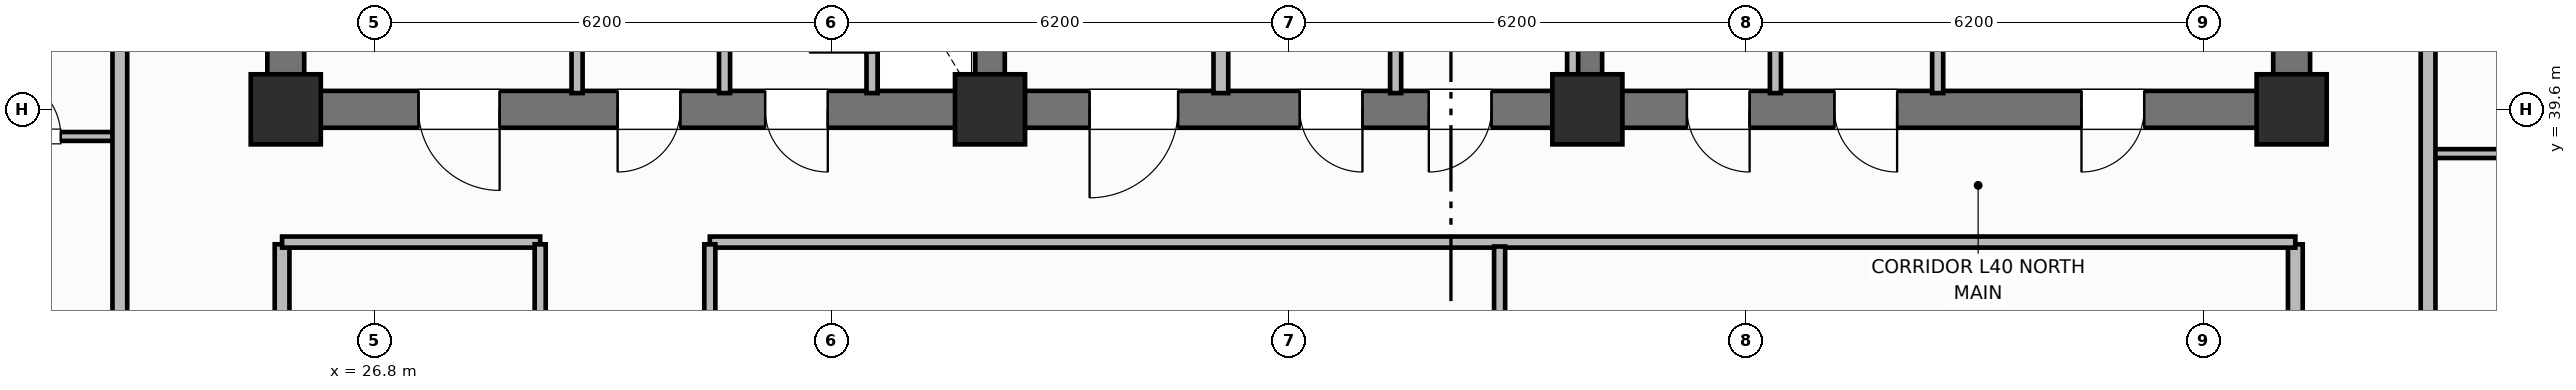
"""IFC4 building model, lengths in metres.
Left out: names, types, materials, properties, quantities, classifications, styles, units other than length and angle.
Written with IfcOpenShell. Run it as: python <this file> out.ifc"""

import sys

from ifc_helpers import new_model, si_unit, direction, frame, frame_2d, origin, origin_2d, place, context, subcontext, project, spatial, rectangle, extrude, element, fill, save


model = new_model("IFC4")
c1 = context("Model", 3, precision=1e-05, world=origin(), true_north=direction((0.0, 1.0)))
c2 = subcontext(c1, "Body", "Model", "MODEL_VIEW")
j1 = project(units=[si_unit("LENGTHUNIT", "METRE"), si_unit("PLANEANGLEUNIT", "RADIAN")], contexts=[c1])
p1 = place(None, origin())
s1 = spatial("IfcSite", under=j1, at=p1, CompositionType="ELEMENT")
p2 = place(p1, origin())
s2 = spatial("IfcBuilding", under=s1, at=p2, CompositionType="ELEMENT")
p3 = place(p2, frame((0.0, 0.0, 162.6)))
s3 = spatial("IfcBuildingStorey", under=s2, at=p3, CompositionType="ELEMENT", Elevation=162.6)
for number, where, z_axis, x_axis in (
    (1, (25.6, 39.85, 0.0), (0.0, 0.0, 1.0), (0.0, 1.0, 0.0)),
    (2, (52.8, 39.85, 0.0), (0.0, 0.0, 1.0), (0.0, 1.0, 0.0)),
):
    element("IfcWall", number, at=place(p3, frame(where, z_axis=z_axis, x_axis=x_axis)), inside=s3, PredefinedType="SHEAR", context=c2, shape_type="SweptSolid", body=[
        extrude(rectangle(XDim=5.7, YDim=0.5, at=frame_2d((2.85, 0.0))), origin(), (0.0, 0.0, 1.0), 3.7),
    ])
p4 = place(p3, frame((52.8, 39.6, 0.0), z_axis=(0.0, 0.0, 1.0), x_axis=(-1.0, 0.0, 0.0)))
e3 = element("IfcWall", 3, at=p4, inside=s3, PredefinedType="SHEAR", context=c2, shape_type="SweptSolid", body=[
    extrude(rectangle(XDim=27.2, YDim=0.5, at=frame_2d((13.6, 0.0))), origin(), (0.0, 0.0, 1.0), 3.7),
])
p5 = place(p4, frame((24.3, 0.0, 0.0)))
e4 = element("IfcOpeningElement", 4, at=p5, cuts=e3, PredefinedType="OPENING", context=c2, shape_type="SweptSolid", body=[
    extrude(rectangle(XDim=1.1, YDim=2.15, at=frame_2d((0.55, 1.075))), frame((0.0, 0.26, 0.0), z_axis=(0.0, -1.0, 0.0), x_axis=(1.0, 0.0, 0.0)), (0.0, 0.0, 1.0), 0.52),
])
p6 = place(p4, frame((21.85, 0.0, 0.0)))
e5 = element("IfcOpeningElement", 5, at=p6, cuts=e3, PredefinedType="OPENING", context=c2, shape_type="SweptSolid", body=[
    extrude(rectangle(XDim=0.85, YDim=2.1, at=frame_2d((0.425, 1.05))), frame((0.0, 0.26, 0.0), z_axis=(0.0, -1.0, 0.0), x_axis=(1.0, 0.0, 0.0)), (0.0, 0.0, 1.0), 0.52),
])
p7 = place(p4, frame((19.85, 0.0, 0.0)))
e6 = element("IfcOpeningElement", 6, at=p7, cuts=e3, PredefinedType="OPENING", context=c2, shape_type="SweptSolid", body=[
    extrude(rectangle(XDim=0.85, YDim=2.1, at=frame_2d((0.425, 1.05))), frame((0.0, 0.26, 0.0), z_axis=(0.0, -1.0, 0.0), x_axis=(1.0, 0.0, 0.0)), (0.0, 0.0, 1.0), 0.52),
])
p8 = place(p4, frame((15.1, 0.0, 0.0)))
e7 = element("IfcOpeningElement", 7, at=p8, cuts=e3, PredefinedType="OPENING", context=c2, shape_type="SweptSolid", body=[
    extrude(rectangle(XDim=1.2, YDim=2.15, at=frame_2d((0.6, 1.075))), frame((0.0, 0.26, 0.0), z_axis=(0.0, -1.0, 0.0), x_axis=(1.0, 0.0, 0.0)), (0.0, 0.0, 1.0), 0.52),
])
p9 = place(p4, frame((12.6, 0.0, 0.0)))
e8 = element("IfcOpeningElement", 8, at=p9, cuts=e3, PredefinedType="OPENING", context=c2, shape_type="SweptSolid", body=[
    extrude(rectangle(XDim=0.85, YDim=2.1, at=frame_2d((0.425, 1.05))), frame((0.0, 0.26, 0.0), z_axis=(0.0, -1.0, 0.0), x_axis=(1.0, 0.0, 0.0)), (0.0, 0.0, 1.0), 0.52),
])
p10 = place(p4, frame((10.85, 0.0, 0.0)))
e9 = element("IfcOpeningElement", 9, at=p10, cuts=e3, PredefinedType="OPENING", context=c2, shape_type="SweptSolid", body=[
    extrude(rectangle(XDim=0.85, YDim=2.1, at=frame_2d((0.425, 1.05))), frame((0.0, 0.26, 0.0), z_axis=(0.0, -1.0, 0.0), x_axis=(1.0, 0.0, 0.0)), (0.0, 0.0, 1.0), 0.52),
])
p11 = place(p4, frame((7.35, 0.0, 0.0)))
e10 = element("IfcOpeningElement", 10, at=p11, cuts=e3, PredefinedType="OPENING", context=c2, shape_type="SweptSolid", body=[
    extrude(rectangle(XDim=0.85, YDim=2.1, at=frame_2d((0.425, 1.05))), frame((0.0, 0.26, 0.0), z_axis=(0.0, -1.0, 0.0), x_axis=(1.0, 0.0, 0.0)), (0.0, 0.0, 1.0), 0.52),
])
p12 = place(p4, frame((5.35, 0.0, 0.0)))
e11 = element("IfcOpeningElement", 11, at=p12, cuts=e3, PredefinedType="OPENING", context=c2, shape_type="SweptSolid", body=[
    extrude(rectangle(XDim=0.85, YDim=2.1, at=frame_2d((0.425, 1.05))), frame((0.0, 0.26, 0.0), z_axis=(0.0, -1.0, 0.0), x_axis=(1.0, 0.0, 0.0)), (0.0, 0.0, 1.0), 0.52),
])
p13 = place(p4, frame((2.0, 0.0, 0.0)))
e12 = element("IfcOpeningElement", 12, at=p13, cuts=e3, PredefinedType="OPENING", context=c2, shape_type="SweptSolid", body=[
    extrude(rectangle(XDim=0.85, YDim=2.1, at=frame_2d((0.425, 1.05))), frame((0.0, 0.26, 0.0), z_axis=(0.0, -1.0, 0.0), x_axis=(1.0, 0.0, 0.0)), (0.0, 0.0, 1.0), 0.52),
])
for number, where, z_axis, x_axis in (
    (13, (35.15, 39.85, 0.0), (0.0, 0.0, 1.0), (0.0, 1.0, 0.0)),
    (14, (43.25, 39.85, 0.0), (0.0, 0.0, 1.0), (0.0, 1.0, 0.0)),
):
    element("IfcWall", number, at=place(p3, frame(where, z_axis=z_axis, x_axis=x_axis)), inside=s3, PredefinedType="SHEAR", context=c2, shape_type="SweptSolid", body=[
        extrude(rectangle(XDim=5.7, YDim=0.4, at=frame_2d((2.85, 0.0))), origin(), (0.0, 0.0, 1.0), 3.7),
    ])
for number, where, z_axis, x_axis in (
    (15, (25.6, 39.6, 0.0), (0.0, 0.0, 1.0), (1.0, 0.0, 0.0)),
    (16, (35.15, 39.6, 0.0), (0.0, 0.0, 1.0), (1.0, 0.0, 0.0)),
    (17, (43.25, 39.6, 0.0), (0.0, 0.0, 1.0), (1.0, 0.0, 0.0)),
    (18, (52.8, 39.6, 0.0), (0.0, 0.0, 1.0), (1.0, 0.0, 0.0)),
):
    element("IfcColumn", number, at=place(p3, frame(where, z_axis=z_axis, x_axis=x_axis)), inside=s3, PredefinedType="COLUMN", context=c2, shape_type="SweptSolid", body=[
        extrude(rectangle(XDim=0.95, YDim=0.95, at=origin_2d()), origin(), (0.0, 0.0, 1.0), 3.7),
    ])
p14 = place(p3, frame((33.55, 39.82, 0.0), z_axis=(0.0, 0.0, 1.0), x_axis=(0.0, 1.0, 0.0)))
e19 = element("IfcWall", 19, at=p14, inside=s3, PredefinedType="PARTITIONING", context=c2, shape_type="SweptSolid", body=[
    extrude(rectangle(XDim=2.13, YDim=0.15, at=frame_2d((1.065, 0.0))), origin(), (0.0, 0.0, 1.0), 2.55),
])
p15 = place(p14, frame((0.55, 0.0, 0.0)))
e20 = element("IfcOpeningElement", 20, at=p15, cuts=e19, PredefinedType="OPENING", context=c2, shape_type="SweptSolid", body=[
    extrude(rectangle(XDim=0.85, YDim=2.05, at=frame_2d((0.425, 1.025))), frame((0.0, 0.085, 0.0), z_axis=(0.0, -1.0, 0.0), x_axis=(1.0, 0.0, 0.0)), (0.0, 0.0, 1.0), 0.17),
])
for number, where, z_axis, x_axis in (
    (21, (29.55, 39.82, 0.0), (0.0, 0.0, 1.0), (0.0, 1.0, 0.0)),
    (22, (31.55, 39.82, 0.0), (0.0, 0.0, 1.0), (0.0, 1.0, 0.0)),
):
    element("IfcWall", number, at=place(p3, frame(where, z_axis=z_axis, x_axis=x_axis)), inside=s3, PredefinedType="PARTITIONING", context=c2, shape_type="SweptSolid", body=[
        extrude(rectangle(XDim=2.13, YDim=0.15, at=frame_2d((1.065, 0.0))), origin(), (0.0, 0.0, 1.0), 2.55),
    ])
p16 = place(p3, frame((38.28, 39.82, 0.0), z_axis=(0.0, 0.0, 1.0), x_axis=(0.0, 1.0, 0.0)))
e23 = element("IfcWall", 23, at=p16, inside=s3, PredefinedType="PARTITIONING", context=c2, shape_type="SweptSolid", body=[
    extrude(rectangle(XDim=5.63, YDim=0.2, at=frame_2d((2.815, 0.0))), origin(), (0.0, 0.0, 1.0), 2.55),
])
for number, where, z_axis, x_axis in (
    (24, (43.05, 39.82, 0.0), (0.0, 0.0, 1.0), (0.0, 1.0, 0.0)),
    (25, (40.65, 39.82, 0.0), (0.0, 0.0, 1.0), (0.0, 1.0, 0.0)),
    (26, (45.8, 39.82, 0.0), (0.0, 0.0, 1.0), (0.0, 1.0, 0.0)),
):
    element("IfcWall", number, at=place(p3, frame(where, z_axis=z_axis, x_axis=x_axis)), inside=s3, PredefinedType="PARTITIONING", context=c2, shape_type="SweptSolid", body=[
        extrude(rectangle(XDim=5.63, YDim=0.15, at=frame_2d((2.815, 0.0))), origin(), (0.0, 0.0, 1.0), 2.55),
    ])
p17 = place(p3, frame((48.0, 39.82, 0.0), z_axis=(0.0, 0.0, 1.0), x_axis=(0.0, 1.0, 0.0)))
e27 = element("IfcWall", 27, at=p17, inside=s3, PredefinedType="PARTITIONING", context=c2, shape_type="SweptSolid", body=[
    extrude(rectangle(XDim=2.73, YDim=0.15, at=frame_2d((1.365, 0.0))), origin(), (0.0, 0.0, 1.0), 2.55),
])
for number, where, z_axis, x_axis in (
    (28, (25.55, 18.63, 0.0), (0.0, 0.0, 1.0), (0.0, 1.0, 0.0)),
    (29, (52.85, 18.63, 0.0), (0.0, 0.0, 1.0), (0.0, 1.0, 0.0)),
):
    element("IfcWall", number, at=place(p3, frame(where, z_axis=z_axis, x_axis=x_axis)), inside=s3, PredefinedType="PARTITIONING", context=c2, shape_type="SweptSolid", body=[
        extrude(rectangle(XDim=19.14, YDim=0.2, at=frame_2d((9.57, 0.0))), origin(), (0.0, 0.0, 1.0), 2.55),
    ])
p18 = place(p3, frame((25.55, 37.8, 0.0), z_axis=(0.0, 0.0, 1.0), x_axis=(1.0, 0.0, 0.0)))
e30 = element("IfcWall", 30, at=p18, inside=s3, PredefinedType="PARTITIONING", context=c2, shape_type="SweptSolid", body=[
    extrude(rectangle(XDim=3.5, YDim=0.15, at=frame_2d((1.75, 0.0))), origin(), (0.0, 0.0, 1.0), 2.55),
])
p19 = place(p3, frame((31.35, 37.8, 0.0), z_axis=(0.0, 0.0, 1.0), x_axis=(1.0, 0.0, 0.0)))
e31 = element("IfcWall", 31, at=p19, inside=s3, PredefinedType="PARTITIONING", context=c2, shape_type="SweptSolid", body=[
    extrude(rectangle(XDim=21.5, YDim=0.15, at=frame_2d((10.75, 0.0))), origin(), (0.0, 0.0, 1.0), 2.55),
])
p20 = place(p3, frame((42.06, 18.66, 0.0), z_axis=(0.0, 0.0, 1.0), x_axis=(0.0, 1.0, 0.0)))
e32 = element("IfcWall", 32, at=p20, inside=s3, PredefinedType="PARTITIONING", context=c2, shape_type="SweptSolid", body=[
    extrude(rectangle(XDim=19.08, YDim=0.15, at=frame_2d((9.54, 0.0))), origin(), (0.0, 0.0, 1.0), 2.55),
])
p21 = place(p20, frame((6.5, 0.0, 0.0)))
e33 = element("IfcOpeningElement", 33, at=p21, cuts=e32, PredefinedType="OPENING", context=c2, shape_type="SweptSolid", body=[
    extrude(rectangle(XDim=1.0, YDim=2.15, at=frame_2d((0.5, 1.075))), frame((0.0, 0.085, 0.0), z_axis=(0.0, -1.0, 0.0), x_axis=(1.0, 0.0, 0.0)), (0.0, 0.0, 1.0), 0.17),
])
p22 = place(p3, frame((29.05, 18.63, 0.0), z_axis=(0.0, 0.0, 1.0), x_axis=(0.0, 1.0, 0.0)))
e34 = element("IfcWall", 34, at=p22, inside=s3, PredefinedType="PARTITIONING", context=c2, shape_type="SweptSolid", body=[
    extrude(rectangle(XDim=19.14, YDim=0.15, at=frame_2d((9.57, 0.0))), origin(), (0.0, 0.0, 1.0), 2.55),
])
p23 = place(p22, frame((5.5, 0.0, 0.0)))
e35 = element("IfcOpeningElement", 35, at=p23, cuts=e34, PredefinedType="OPENING", context=c2, shape_type="SweptSolid", body=[
    extrude(rectangle(XDim=1.0, YDim=2.15, at=frame_2d((0.5, 1.075))), frame((0.0, 0.085, 0.0), z_axis=(0.0, -1.0, 0.0), x_axis=(1.0, 0.0, 0.0)), (0.0, 0.0, 1.0), 0.17),
])
p24 = place(p3, frame((31.35, 18.63, 0.0), z_axis=(0.0, 0.0, 1.0), x_axis=(0.0, 1.0, 0.0)))
e36 = element("IfcWall", 36, at=p24, inside=s3, PredefinedType="PARTITIONING", context=c2, shape_type="SweptSolid", body=[
    extrude(rectangle(XDim=19.14, YDim=0.15, at=frame_2d((9.57, 0.0))), origin(), (0.0, 0.0, 1.0), 2.55),
])
p25 = place(p24, frame((5.5, 0.0, 0.0)))
e37 = element("IfcOpeningElement", 37, at=p25, cuts=e36, PredefinedType="OPENING", context=c2, shape_type="SweptSolid", body=[
    extrude(rectangle(XDim=1.0, YDim=2.15, at=frame_2d((0.5, 1.075))), frame((0.0, 0.085, 0.0), z_axis=(0.0, -1.0, 0.0), x_axis=(1.0, 0.0, 0.0)), (0.0, 0.0, 1.0), 0.17),
])
p26 = place(p3, frame((21.1, 39.232, 0.0), z_axis=(0.0, 0.0, 1.0), x_axis=(1.0, 0.0, 0.0)))
e38 = element("IfcWall", 38, at=p26, inside=s3, PredefinedType="PARTITIONING", context=c2, shape_type="SweptSolid", body=[
    extrude(rectangle(XDim=2.25, YDim=0.12, at=frame_2d((1.125, 0.0))), origin(), (0.0, 0.0, 1.0), 2.55),
])
p27 = place(p26, frame((0.6, 0.0, 0.0)))
e39 = element("IfcOpeningElement", 39, at=p27, cuts=e38, PredefinedType="OPENING", context=c2, shape_type="SweptSolid", body=[
    extrude(rectangle(XDim=0.85, YDim=2.1, at=frame_2d((0.425, 1.05))), frame((0.0, 0.07, 0.0), z_axis=(0.0, -1.0, 0.0), x_axis=(1.0, 0.0, 0.0)), (0.0, 0.0, 1.0), 0.14),
])
p28 = place(p3, frame((23.35, 10.6, 0.0), z_axis=(0.0, 0.0, 1.0), x_axis=(0.0, 1.0, 0.0)))
e40 = element("IfcWall", 40, at=p28, inside=s3, PredefinedType="PARTITIONING", context=c2, shape_type="SweptSolid", body=[
    extrude(rectangle(XDim=35.2, YDim=0.2, at=frame_2d((17.6, 0.0))), origin(), (0.0, 0.0, 1.0), 2.55),
])
p29 = place(p28, frame((2.65, 0.0, 0.0)))
e41 = element("IfcOpeningElement", 41, at=p29, cuts=e40, PredefinedType="OPENING", context=c2, shape_type="SweptSolid", body=[
    extrude(rectangle(XDim=1.0, YDim=2.15, at=frame_2d((0.5, 1.075))), frame((0.0, 0.11, 0.0), z_axis=(0.0, -1.0, 0.0), x_axis=(1.0, 0.0, 0.0)), (0.0, 0.0, 1.0), 0.22),
])
p30 = place(p28, frame((12.65, 0.0, 0.0)))
e42 = element("IfcOpeningElement", 42, at=p30, cuts=e40, PredefinedType="OPENING", context=c2, shape_type="SweptSolid", body=[
    extrude(rectangle(XDim=1.0, YDim=2.15, at=frame_2d((0.5, 1.075))), frame((0.0, 0.11, 0.0), z_axis=(0.0, -1.0, 0.0), x_axis=(1.0, 0.0, 0.0)), (0.0, 0.0, 1.0), 0.22),
])
p31 = place(p28, frame((23.782, 0.0, 0.0)))
e43 = element("IfcOpeningElement", 43, at=p31, cuts=e40, PredefinedType="OPENING", context=c2, shape_type="SweptSolid", body=[
    extrude(rectangle(XDim=1.0, YDim=2.15, at=frame_2d((0.5, 1.075))), frame((0.0, 0.11, 0.0), z_axis=(0.0, -1.0, 0.0), x_axis=(1.0, 0.0, 0.0)), (0.0, 0.0, 1.0), 0.22),
])
p32 = place(p3, frame((54.65, 39.0, 0.0), z_axis=(0.0, 0.0, 1.0), x_axis=(1.0, 0.0, 0.0)))
e44 = element("IfcWall", 44, at=p32, inside=s3, PredefinedType="PARTITIONING", context=c2, shape_type="SweptSolid", body=[
    extrude(rectangle(XDim=2.25, YDim=0.12, at=frame_2d((1.125, 0.0))), origin(), (0.0, 0.0, 1.0), 2.55),
])
p33 = place(p3, frame((54.65, 10.6, 0.0), z_axis=(0.0, 0.0, 1.0), x_axis=(0.0, 1.0, 0.0)))
e45 = element("IfcWall", 45, at=p33, inside=s3, PredefinedType="PARTITIONING", context=c2, shape_type="SweptSolid", body=[
    extrude(rectangle(XDim=35.2, YDim=0.2, at=frame_2d((17.6, 0.0))), origin(), (0.0, 0.0, 1.0), 2.55),
])
p34 = place(p33, frame((2.65, 0.0, 0.0)))
e46 = element("IfcOpeningElement", 46, at=p34, cuts=e45, PredefinedType="OPENING", context=c2, shape_type="SweptSolid", body=[
    extrude(rectangle(XDim=1.0, YDim=2.15, at=frame_2d((0.5, 1.075))), frame((0.0, 0.11, 0.0), z_axis=(0.0, -1.0, 0.0), x_axis=(1.0, 0.0, 0.0)), (0.0, 0.0, 1.0), 0.22),
])
p35 = place(p33, frame((22.75, 0.0, 0.0)))
e47 = element("IfcOpeningElement", 47, at=p35, cuts=e45, PredefinedType="OPENING", context=c2, shape_type="SweptSolid", body=[
    extrude(rectangle(XDim=1.0, YDim=2.15, at=frame_2d((0.5, 1.075))), frame((0.0, 0.11, 0.0), z_axis=(0.0, -1.0, 0.0), x_axis=(1.0, 0.0, 0.0)), (0.0, 0.0, 1.0), 0.22),
])
p36 = place(p15, origin())
e48 = element("IfcDoor", 48, at=p36, inside=s3, OperationType="SINGLE_SWING_LEFT", PredefinedType="TRAPDOOR", context=c2, shape_type="SweptSolid", body=[
    extrude(rectangle(XDim=0.85, YDim=2.05, at=frame_2d((0.425, 1.025))), frame((0.0, 0.025, 0.0), z_axis=(0.0, -1.0, 0.0), x_axis=(1.0, 0.0, 0.0)), (0.0, 0.0, 1.0), 0.05),
])
fill(e20, e48)
p37 = place(p27, origin())
e49 = element("IfcDoor", 49, at=p37, inside=s3, OperationType="SINGLE_SWING_LEFT", PredefinedType="DOOR", context=c2, shape_type="SweptSolid", body=[
    extrude(rectangle(XDim=0.85, YDim=2.1, at=frame_2d((0.425, 1.05))), frame((0.0, 0.025, 0.0), z_axis=(0.0, -1.0, 0.0), x_axis=(1.0, 0.0, 0.0)), (0.0, 0.0, 1.0), 0.05),
])
fill(e39, e49)
p38 = place(p5, origin())
e50 = element("IfcDoor", 50, at=p38, inside=s3, OperationType="SINGLE_SWING_LEFT", PredefinedType="DOOR", context=c2, shape_type="SweptSolid", body=[
    extrude(rectangle(XDim=1.1, YDim=2.15, at=frame_2d((0.55, 1.075))), frame((0.0, 0.025, 0.0), z_axis=(0.0, -1.0, 0.0), x_axis=(1.0, 0.0, 0.0)), (0.0, 0.0, 1.0), 0.05),
])
fill(e4, e50)
p39 = place(p6, origin())
e51 = element("IfcDoor", 51, at=p39, inside=s3, OperationType="SINGLE_SWING_RIGHT", PredefinedType="DOOR", context=c2, shape_type="SweptSolid", body=[
    extrude(rectangle(XDim=0.85, YDim=2.1, at=frame_2d((0.425, 1.05))), frame((0.0, 0.025, 0.0), z_axis=(0.0, -1.0, 0.0), x_axis=(1.0, 0.0, 0.0)), (0.0, 0.0, 1.0), 0.05),
])
fill(e5, e51)
p40 = place(p7, origin())
e52 = element("IfcDoor", 52, at=p40, inside=s3, OperationType="SINGLE_SWING_LEFT", PredefinedType="DOOR", context=c2, shape_type="SweptSolid", body=[
    extrude(rectangle(XDim=0.85, YDim=2.1, at=frame_2d((0.425, 1.05))), frame((0.0, 0.025, 0.0), z_axis=(0.0, -1.0, 0.0), x_axis=(1.0, 0.0, 0.0)), (0.0, 0.0, 1.0), 0.05),
])
fill(e6, e52)
p41 = place(p8, origin())
e53 = element("IfcDoor", 53, at=p41, inside=s3, OperationType="SINGLE_SWING_RIGHT", PredefinedType="DOOR", context=c2, shape_type="SweptSolid", body=[
    extrude(rectangle(XDim=1.2, YDim=2.15, at=frame_2d((0.6, 1.075))), frame((0.0, 0.025, 0.0), z_axis=(0.0, -1.0, 0.0), x_axis=(1.0, 0.0, 0.0)), (0.0, 0.0, 1.0), 0.05),
])
fill(e7, e53)
p42 = place(p9, origin())
e54 = element("IfcDoor", 54, at=p42, inside=s3, OperationType="SINGLE_SWING_LEFT", PredefinedType="DOOR", context=c2, shape_type="SweptSolid", body=[
    extrude(rectangle(XDim=0.85, YDim=2.1, at=frame_2d((0.425, 1.05))), frame((0.0, 0.025, 0.0), z_axis=(0.0, -1.0, 0.0), x_axis=(1.0, 0.0, 0.0)), (0.0, 0.0, 1.0), 0.05),
])
fill(e8, e54)
p43 = place(p10, origin())
e55 = element("IfcDoor", 55, at=p43, inside=s3, OperationType="SINGLE_SWING_RIGHT", PredefinedType="DOOR", context=c2, shape_type="SweptSolid", body=[
    extrude(rectangle(XDim=0.85, YDim=2.1, at=frame_2d((0.425, 1.05))), frame((0.0, 0.025, 0.0), z_axis=(0.0, -1.0, 0.0), x_axis=(1.0, 0.0, 0.0)), (0.0, 0.0, 1.0), 0.05),
])
fill(e9, e55)
p44 = place(p11, origin())
e56 = element("IfcDoor", 56, at=p44, inside=s3, OperationType="SINGLE_SWING_LEFT", PredefinedType="DOOR", context=c2, shape_type="SweptSolid", body=[
    extrude(rectangle(XDim=0.85, YDim=2.1, at=frame_2d((0.425, 1.05))), frame((0.0, 0.025, 0.0), z_axis=(0.0, -1.0, 0.0), x_axis=(1.0, 0.0, 0.0)), (0.0, 0.0, 1.0), 0.05),
])
fill(e10, e56)
p45 = place(p12, origin())
e57 = element("IfcDoor", 57, at=p45, inside=s3, OperationType="SINGLE_SWING_LEFT", PredefinedType="DOOR", context=c2, shape_type="SweptSolid", body=[
    extrude(rectangle(XDim=0.85, YDim=2.1, at=frame_2d((0.425, 1.05))), frame((0.0, 0.025, 0.0), z_axis=(0.0, -1.0, 0.0), x_axis=(1.0, 0.0, 0.0)), (0.0, 0.0, 1.0), 0.05),
])
fill(e11, e57)
p46 = place(p13, origin())
e58 = element("IfcDoor", 58, at=p46, inside=s3, OperationType="SINGLE_SWING_RIGHT", PredefinedType="DOOR", context=c2, shape_type="SweptSolid", body=[
    extrude(rectangle(XDim=0.85, YDim=2.1, at=frame_2d((0.425, 1.05))), frame((0.0, 0.025, 0.0), z_axis=(0.0, -1.0, 0.0), x_axis=(1.0, 0.0, 0.0)), (0.0, 0.0, 1.0), 0.05),
])
fill(e12, e58)
save(model, sys.argv[1])
